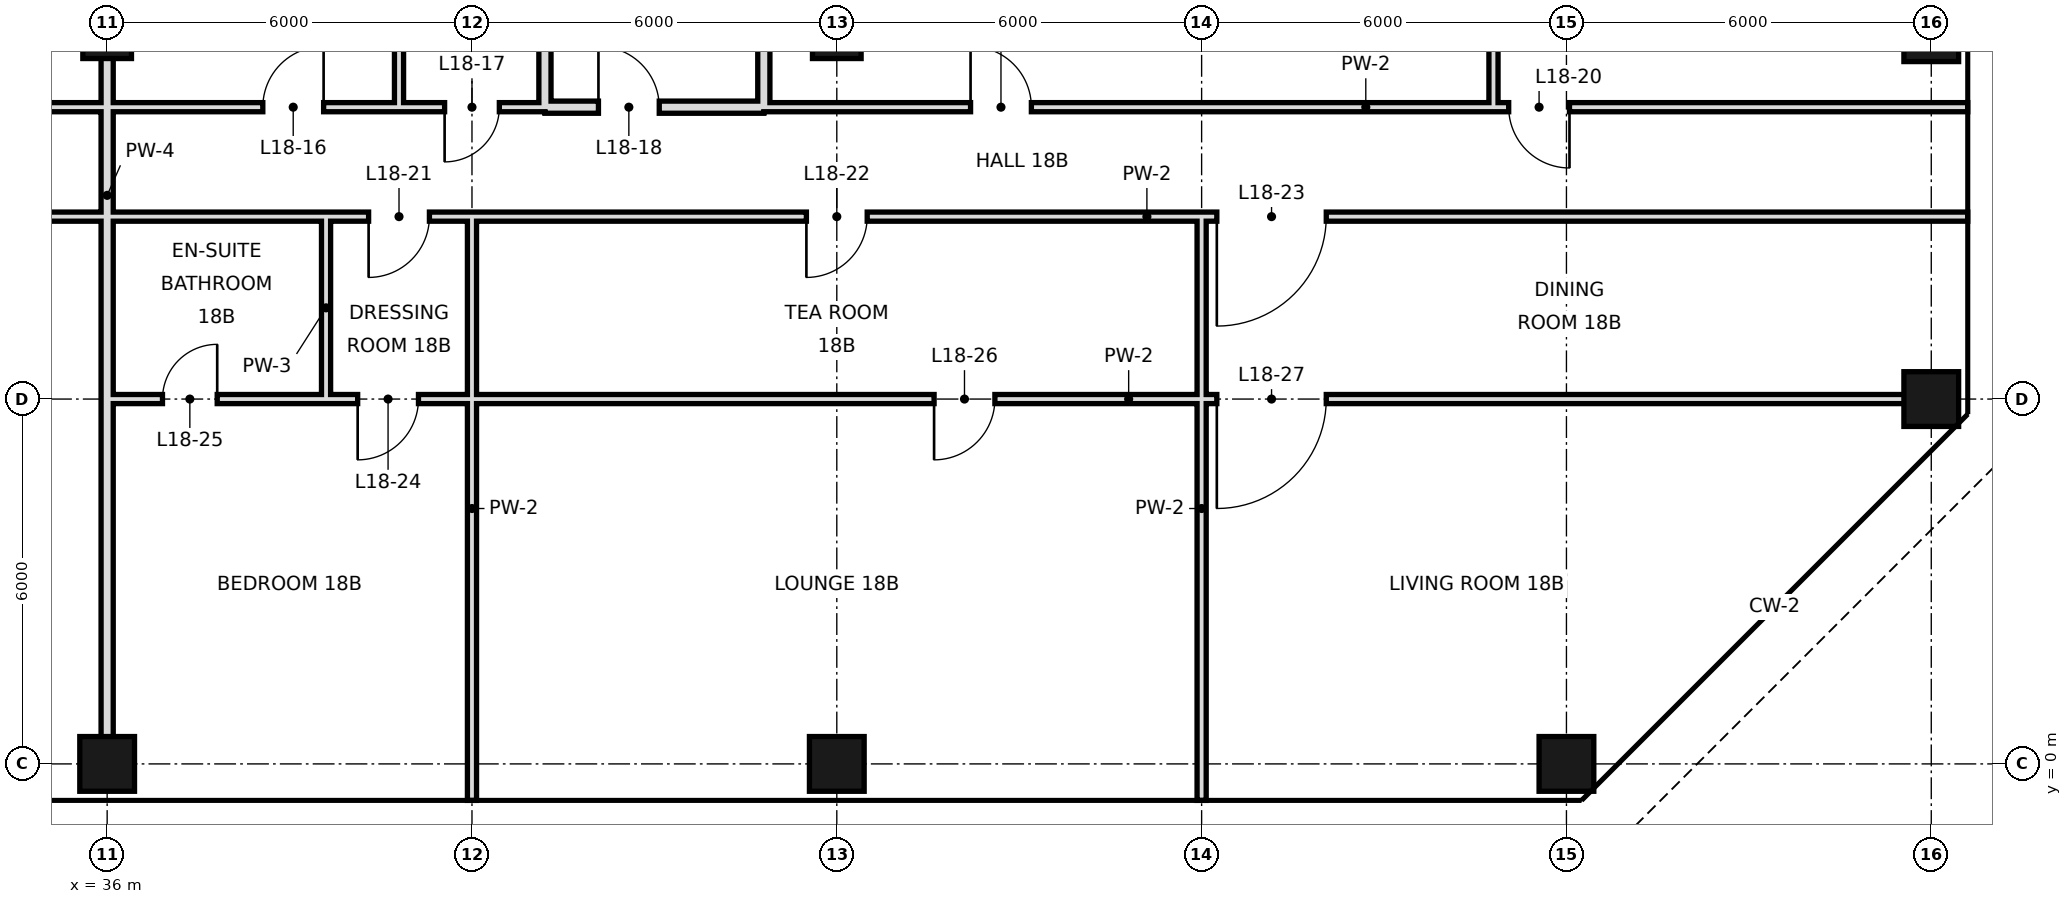
"""IFC4 building model, lengths in metres.
Left out: names, types, materials, properties, quantities, classifications, styles, units other than length and angle.
Written with IfcOpenShell. Run it as: python <this file> out.ifc"""

import sys

from ifc_helpers import new_model, si_unit, direction, frame, frame_2d, origin, origin_2d, place, context, subcontext, project, spatial, rectangle, hollow_rectangle, extrude, element, fill, save


model = new_model("IFC4")
c1 = context("Model", 3, precision=1e-05, world=origin(), true_north=direction((0.0, 1.0)))
c2 = subcontext(c1, "Body", "Model", "MODEL_VIEW")
j1 = project(units=[si_unit("LENGTHUNIT", "METRE"), si_unit("PLANEANGLEUNIT", "RADIAN")], contexts=[c1])
p1 = place(None, origin())
s1 = spatial("IfcSite", under=j1, at=p1, CompositionType="ELEMENT")
p2 = place(p1, origin())
s2 = spatial("IfcBuilding", under=s1, at=p2, CompositionType="ELEMENT")
p3 = place(p2, frame((0.0, 0.0, 85.8)))
s3 = spatial("IfcBuildingStorey", under=s2, at=p3, CompositionType="ELEMENT", Elevation=85.8)
p4 = place(p3, frame((36.0, 0.0, 0.0), z_axis=(0.0, 0.0, 1.0), x_axis=(1.0, 0.0, 0.0)))
e1 = element("IfcColumn", 1, at=p4, inside=s3, PredefinedType="COLUMN", context=c2, shape_type="SweptSolid", body=[
    extrude(hollow_rectangle(XDim=0.9, YDim=0.9, WallThickness=0.045, at=origin_2d()), origin(), (0.0, 0.0, 1.0), 4.4),
])
p5 = place(p3, frame((36.0, 12.0, 0.0), z_axis=(0.0, 0.0, 1.0), x_axis=(1.0, 0.0, 0.0)))
e2 = element("IfcColumn", 2, at=p5, inside=s3, PredefinedType="COLUMN", context=c2, shape_type="SweptSolid", body=[
    extrude(hollow_rectangle(XDim=0.8, YDim=0.8, WallThickness=0.04, at=origin_2d()), origin(), (0.0, 0.0, 1.0), 4.4),
])
p6 = place(p3, frame((48.0, 0.0, 0.0), z_axis=(0.0, 0.0, 1.0), x_axis=(1.0, 0.0, 0.0)))
e3 = element("IfcColumn", 3, at=p6, inside=s3, PredefinedType="COLUMN", context=c2, shape_type="SweptSolid", body=[
    extrude(hollow_rectangle(XDim=0.9, YDim=0.9, WallThickness=0.045, at=origin_2d()), origin(), (0.0, 0.0, 1.0), 4.4),
])
p7 = place(p3, frame((48.0, 12.0, 0.0), z_axis=(0.0, 0.0, 1.0), x_axis=(1.0, 0.0, 0.0)))
e4 = element("IfcColumn", 4, at=p7, inside=s3, PredefinedType="COLUMN", context=c2, shape_type="SweptSolid", body=[
    extrude(hollow_rectangle(XDim=0.8, YDim=0.8, WallThickness=0.04, at=origin_2d()), origin(), (0.0, 0.0, 1.0), 4.4),
])
for number, where, z_axis, x_axis in (
    (5, (60.0, 0.0, 0.0), (0.0, 0.0, 1.0), (1.0, 0.0, 0.0)),
    (6, (66.0, 6.0, 0.0), (0.0, 0.0, 1.0), (1.0, 0.0, 0.0)),
    (7, (66.0, 12.0, 0.0), (0.0, 0.0, 1.0), (1.0, 0.0, 0.0)),
):
    element("IfcColumn", number, at=place(p3, frame(where, z_axis=z_axis, x_axis=x_axis)), inside=s3, PredefinedType="COLUMN", context=c2, shape_type="SweptSolid", body=[
        extrude(hollow_rectangle(XDim=0.9, YDim=0.9, WallThickness=0.045, at=origin_2d()), origin(), (0.0, 0.0, 1.0), 4.4),
    ])
p8 = place(p3, frame((36.0, 0.0, 0.0), z_axis=(0.0, 0.0, 1.0), x_axis=(0.0, 1.0, 0.0)))
e8 = element("IfcWall", 8, at=p8, inside=s3, PredefinedType="SOLIDWALL", context=c2, shape_type="SweptSolid", body=[
    extrude(rectangle(XDim=18.7, YDim=0.2, at=frame_2d((9.35, 0.0))), origin(), (0.0, 0.0, 1.0), 3.4),
])
p9 = place(p3, frame((39.6, 6.0, 0.0), z_axis=(0.0, 0.0, 1.0), x_axis=(0.0, 1.0, 0.0)))
e9 = element("IfcWall", 9, at=p9, inside=s3, PredefinedType="PARTITIONING", context=c2, shape_type="SweptSolid", body=[
    extrude(rectangle(XDim=3.0, YDim=0.15, at=frame_2d((1.5, 0.0))), origin(), (0.0, 0.0, 1.0), 4.1),
])
p10 = place(p3, frame((40.8, 10.8, 0.0), z_axis=(0.0, 0.0, 1.0), x_axis=(0.0, 1.0, 0.0)))
e10 = element("IfcWall", 10, at=p10, inside=s3, PredefinedType="PARTITIONING", context=c2, shape_type="SweptSolid", body=[
    extrude(rectangle(XDim=7.9, YDim=0.15, at=frame_2d((3.95, 0.0))), origin(), (0.0, 0.0, 1.0), 4.1),
])
p11 = place(p3, frame((42.0, -0.6, 0.0), z_axis=(0.0, 0.0, 1.0), x_axis=(0.0, 1.0, 0.0)))
e11 = element("IfcWall", 11, at=p11, inside=s3, PredefinedType="PARTITIONING", context=c2, shape_type="SweptSolid", body=[
    extrude(rectangle(XDim=9.6, YDim=0.15, at=frame_2d((4.8, 0.0))), origin(), (0.0, 0.0, 1.0), 3.4),
])
p12 = place(p3, frame((43.2, 10.8, 0.0), z_axis=(0.0, 0.0, 1.0), x_axis=(0.0, 1.0, 0.0)))
e12 = element("IfcWall", 12, at=p12, inside=s3, PredefinedType="SOLIDWALL", context=c2, shape_type="SweptSolid", body=[
    extrude(rectangle(XDim=7.9, YDim=0.2, at=frame_2d((3.95, 0.0))), origin(), (0.0, 0.0, 1.0), 3.4),
])
p13 = place(p3, frame((46.8, 10.8, 0.0), z_axis=(0.0, 0.0, 1.0), x_axis=(0.0, 1.0, 0.0)))
e13 = element("IfcWall", 13, at=p13, inside=s3, PredefinedType="SOLIDWALL", context=c2, shape_type="SweptSolid", body=[
    extrude(rectangle(XDim=7.2, YDim=0.2, at=frame_2d((3.6, 0.0))), origin(), (0.0, 0.0, 1.0), 3.4),
])
p14 = place(p3, frame((54.0, -0.6, 0.0), z_axis=(0.0, 0.0, 1.0), x_axis=(0.0, 1.0, 0.0)))
e14 = element("IfcWall", 14, at=p14, inside=s3, PredefinedType="PARTITIONING", context=c2, shape_type="SweptSolid", body=[
    extrude(rectangle(XDim=9.6, YDim=0.15, at=frame_2d((4.8, 0.0))), origin(), (0.0, 0.0, 1.0), 4.1),
])
p15 = place(p3, frame((58.8, 10.8, 0.0), z_axis=(0.0, 0.0, 1.0), x_axis=(0.0, 1.0, 0.0)))
e15 = element("IfcWall", 15, at=p15, inside=s3, PredefinedType="PARTITIONING", context=c2, shape_type="SweptSolid", body=[
    extrude(rectangle(XDim=7.2, YDim=0.15, at=frame_2d((3.6, 0.0))), origin(), (0.0, 0.0, 1.0), 4.1),
])
p16 = place(p3, frame((43.2, 10.8, 0.0), z_axis=(0.0, 0.0, 1.0), x_axis=(1.0, 0.0, 0.0)))
e16 = element("IfcWall", 16, at=p16, inside=s3, PredefinedType="SOLIDWALL", context=c2, shape_type="SweptSolid", body=[
    extrude(rectangle(XDim=3.6, YDim=0.2, at=frame_2d((1.8, 0.0))), origin(), (0.0, 0.0, 1.0), 4.1),
])
p17 = place(p16, frame((0.88, 0.0, 0.0)))
e17 = element("IfcOpeningElement", 17, at=p17, cuts=e16, PredefinedType="OPENING", context=c2, shape_type="SweptSolid", body=[
    extrude(rectangle(XDim=1.0, YDim=2.4, at=frame_2d((0.5, 1.2))), frame((0.0, 0.11, 0.0), z_axis=(0.0, -1.0, 0.0), x_axis=(1.0, 0.0, 0.0)), (0.0, 0.0, 1.0), 0.22),
])
p18 = place(p3, frame((19.2, 10.8, 0.0), z_axis=(0.0, 0.0, 1.0), x_axis=(1.0, 0.0, 0.0)))
e18 = element("IfcWall", 18, at=p18, inside=s3, PredefinedType="PARTITIONING", context=c2, shape_type="SweptSolid", body=[
    extrude(rectangle(XDim=21.6, YDim=0.15, at=frame_2d((10.8, 0.0))), origin(), (0.0, 0.0, 1.0), 4.1),
])
p19 = place(p18, frame((13.9, 0.0, 0.0)))
e19 = element("IfcOpeningElement", 19, at=p19, cuts=e18, PredefinedType="OPENING", context=c2, shape_type="SweptSolid", body=[
    extrude(rectangle(XDim=1.0, YDim=2.4, at=frame_2d((0.5, 1.2))), frame((0.0, 0.085, 0.0), z_axis=(0.0, -1.0, 0.0), x_axis=(1.0, 0.0, 0.0)), (0.0, 0.0, 1.0), 0.17),
])
p20 = place(p18, frame((5.5, 0.0, 0.0)))
e20 = element("IfcOpeningElement", 20, at=p20, cuts=e18, PredefinedType="OPENING", context=c2, shape_type="SweptSolid", body=[
    extrude(rectangle(XDim=1.0, YDim=2.4, at=frame_2d((0.5, 1.2))), frame((0.0, 0.085, 0.0), z_axis=(0.0, -1.0, 0.0), x_axis=(1.0, 0.0, 0.0)), (0.0, 0.0, 1.0), 0.17),
])
p21 = place(p18, frame((19.36, 0.0, 0.0)))
e21 = element("IfcOpeningElement", 21, at=p21, cuts=e18, PredefinedType="OPENING", context=c2, shape_type="SweptSolid", body=[
    extrude(rectangle(XDim=1.0, YDim=2.4, at=frame_2d((0.5, 1.2))), frame((0.0, 0.085, 0.0), z_axis=(0.0, -1.0, 0.0), x_axis=(1.0, 0.0, 0.0)), (0.0, 0.0, 1.0), 0.17),
])
p22 = place(p3, frame((46.8, 10.8, 0.0), z_axis=(0.0, 0.0, 1.0), x_axis=(1.0, 0.0, 0.0)))
e22 = element("IfcWall", 22, at=p22, inside=s3, PredefinedType="PARTITIONING", context=c2, shape_type="SweptSolid", body=[
    extrude(rectangle(XDim=19.8, YDim=0.15, at=frame_2d((9.9, 0.0))), origin(), (0.0, 0.0, 1.0), 4.1),
])
p23 = place(p22, frame((3.4, 0.0, 0.0)))
e23 = element("IfcOpeningElement", 23, at=p23, cuts=e22, PredefinedType="OPENING", context=c2, shape_type="SweptSolid", body=[
    extrude(rectangle(XDim=1.0, YDim=2.4, at=frame_2d((0.5, 1.2))), frame((0.0, 0.085, 0.0), z_axis=(0.0, -1.0, 0.0), x_axis=(1.0, 0.0, 0.0)), (0.0, 0.0, 1.0), 0.17),
])
p24 = place(p22, frame((12.25, 0.0, 0.0)))
e24 = element("IfcOpeningElement", 24, at=p24, cuts=e22, PredefinedType="OPENING", context=c2, shape_type="SweptSolid", body=[
    extrude(rectangle(XDim=1.0, YDim=2.4, at=frame_2d((0.5, 1.2))), frame((0.0, 0.085, 0.0), z_axis=(0.0, -1.0, 0.0), x_axis=(1.0, 0.0, 0.0)), (0.0, 0.0, 1.0), 0.17),
])
p25 = place(p3, frame((40.8, 10.8, 0.0), z_axis=(0.0, 0.0, 1.0), x_axis=(1.0, 0.0, 0.0)))
e25 = element("IfcWall", 25, at=p25, inside=s3, PredefinedType="PARTITIONING", context=c2, shape_type="SweptSolid", body=[
    extrude(rectangle(XDim=2.4, YDim=0.15, at=frame_2d((1.2, 0.0))), origin(), (0.0, 0.0, 1.0), 4.1),
])
p26 = place(p25, frame((0.75, 0.0, 0.0)))
e26 = element("IfcOpeningElement", 26, at=p26, cuts=e25, PredefinedType="OPENING", context=c2, shape_type="SweptSolid", body=[
    extrude(rectangle(XDim=0.9, YDim=2.4, at=frame_2d((0.45, 1.2))), frame((0.0, 0.085, 0.0), z_axis=(0.0, -1.0, 0.0), x_axis=(1.0, 0.0, 0.0)), (0.0, 0.0, 1.0), 0.17),
])
p27 = place(p3, frame((39.6, 6.0, 0.0), z_axis=(0.0, 0.0, 1.0), x_axis=(1.0, 0.0, 0.0)))
e27 = element("IfcWall", 27, at=p27, inside=s3, PredefinedType="PARTITIONING", context=c2, shape_type="SweptSolid", body=[
    extrude(rectangle(XDim=26.4, YDim=0.15, at=frame_2d((13.2, 0.0))), origin(), (0.0, 0.0, 1.0), 3.2),
])
p28 = place(p27, frame((0.52, 0.0, 0.0)))
e28 = element("IfcOpeningElement", 28, at=p28, cuts=e27, PredefinedType="OPENING", context=c2, shape_type="SweptSolid", body=[
    extrude(rectangle(XDim=1.0, YDim=2.4, at=frame_2d((0.5, 1.2))), frame((0.0, 0.085, 0.0), z_axis=(0.0, -1.0, 0.0), x_axis=(1.0, 0.0, 0.0)), (0.0, 0.0, 1.0), 0.17),
])
p29 = place(p27, frame((10.0, 0.0, 0.0)))
e29 = element("IfcOpeningElement", 29, at=p29, cuts=e27, PredefinedType="OPENING", context=c2, shape_type="SweptSolid", body=[
    extrude(rectangle(XDim=1.0, YDim=2.4, at=frame_2d((0.5, 1.2))), frame((0.0, 0.085, 0.0), z_axis=(0.0, -1.0, 0.0), x_axis=(1.0, 0.0, 0.0)), (0.0, 0.0, 1.0), 0.17),
])
p30 = place(p27, frame((14.65, 0.0, 0.0)))
e30 = element("IfcOpeningElement", 30, at=p30, cuts=e27, PredefinedType="OPENING", context=c2, shape_type="SweptSolid", body=[
    extrude(rectangle(XDim=1.8, YDim=2.4, at=frame_2d((0.9, 1.2))), frame((0.0, 0.085, 0.0), z_axis=(0.0, -1.0, 0.0), x_axis=(1.0, 0.0, 0.0)), (0.0, 0.0, 1.0), 0.17),
])
p31 = place(p3, frame((36.0, 6.0, 0.0), z_axis=(0.0, 0.0, 1.0), x_axis=(1.0, 0.0, 0.0)))
e31 = element("IfcWall", 31, at=p31, inside=s3, PredefinedType="PARTITIONING", context=c2, shape_type="SweptSolid", body=[
    extrude(rectangle(XDim=3.6, YDim=0.15, at=frame_2d((1.8, 0.0))), origin(), (0.0, 0.0, 1.0), 3.65),
])
p32 = place(p31, frame((0.91, 0.0, 0.0)))
e32 = element("IfcOpeningElement", 32, at=p32, cuts=e31, PredefinedType="OPENING", context=c2, shape_type="SweptSolid", body=[
    extrude(rectangle(XDim=0.9, YDim=2.4, at=frame_2d((0.45, 1.2))), frame((0.0, 0.085, 0.0), z_axis=(0.0, -1.0, 0.0), x_axis=(1.0, 0.0, 0.0)), (0.0, 0.0, 1.0), 0.17),
])
p33 = place(p3, frame((18.0, 9.0, 0.0), z_axis=(0.0, 0.0, 1.0), x_axis=(1.0, 0.0, 0.0)))
e33 = element("IfcWall", 33, at=p33, inside=s3, PredefinedType="PARTITIONING", context=c2, shape_type="SweptSolid", body=[
    extrude(rectangle(XDim=18.0, YDim=0.15, at=frame_2d((9.0, 0.0))), origin(), (0.0, 0.0, 1.0), 4.1),
])
p34 = place(p33, frame((3.16, 0.0, 0.0)))
e34 = element("IfcOpeningElement", 34, at=p34, cuts=e33, PredefinedType="OPENING", context=c2, shape_type="SweptSolid", body=[
    extrude(rectangle(XDim=1.8, YDim=2.4, at=frame_2d((0.9, 1.2))), frame((0.0, 0.085, 0.0), z_axis=(0.0, -1.0, 0.0), x_axis=(1.0, 0.0, 0.0)), (0.0, 0.0, 1.0), 0.17),
])
p35 = place(p33, frame((13.6, 0.0, 0.0)))
e35 = element("IfcOpeningElement", 35, at=p35, cuts=e33, PredefinedType="OPENING", context=c2, shape_type="SweptSolid", body=[
    extrude(rectangle(XDim=1.0, YDim=2.4, at=frame_2d((0.5, 1.2))), frame((0.0, 0.085, 0.0), z_axis=(0.0, -1.0, 0.0), x_axis=(1.0, 0.0, 0.0)), (0.0, 0.0, 1.0), 0.17),
])
p36 = place(p3, frame((39.6, 9.0, 0.0), z_axis=(0.0, 0.0, 1.0), x_axis=(1.0, 0.0, 0.0)))
e36 = element("IfcWall", 36, at=p36, inside=s3, PredefinedType="PARTITIONING", context=c2, shape_type="SweptSolid", body=[
    extrude(rectangle(XDim=27.0, YDim=0.15, at=frame_2d((13.5, 0.0))), origin(), (0.0, 0.0, 1.0), 4.1),
])
p37 = place(p36, frame((0.7, 0.0, 0.0)))
e37 = element("IfcOpeningElement", 37, at=p37, cuts=e36, PredefinedType="OPENING", context=c2, shape_type="SweptSolid", body=[
    extrude(rectangle(XDim=1.0, YDim=2.4, at=frame_2d((0.5, 1.2))), frame((0.0, 0.085, 0.0), z_axis=(0.0, -1.0, 0.0), x_axis=(1.0, 0.0, 0.0)), (0.0, 0.0, 1.0), 0.17),
])
p38 = place(p36, frame((7.9, 0.0, 0.0)))
e38 = element("IfcOpeningElement", 38, at=p38, cuts=e36, PredefinedType="OPENING", context=c2, shape_type="SweptSolid", body=[
    extrude(rectangle(XDim=1.0, YDim=2.4, at=frame_2d((0.5, 1.2))), frame((0.0, 0.085, 0.0), z_axis=(0.0, -1.0, 0.0), x_axis=(1.0, 0.0, 0.0)), (0.0, 0.0, 1.0), 0.17),
])
p39 = place(p36, frame((14.65, 0.0, 0.0)))
e39 = element("IfcOpeningElement", 39, at=p39, cuts=e36, PredefinedType="OPENING", context=c2, shape_type="SweptSolid", body=[
    extrude(rectangle(XDim=1.8, YDim=2.4, at=frame_2d((0.9, 1.2))), frame((0.0, 0.085, 0.0), z_axis=(0.0, -1.0, 0.0), x_axis=(1.0, 0.0, 0.0)), (0.0, 0.0, 1.0), 0.17),
])
p40 = place(p3, frame((36.0, 9.0, 0.0), z_axis=(0.0, 0.0, 1.0), x_axis=(1.0, 0.0, 0.0)))
e40 = element("IfcWall", 40, at=p40, inside=s3, PredefinedType="PARTITIONING", context=c2, shape_type="SweptSolid", body=[
    extrude(rectangle(XDim=3.6, YDim=0.15, at=frame_2d((1.8, 0.0))), origin(), (0.0, 0.0, 1.0), 4.1),
])
p41 = place(p21, frame((1.0, 0.0, 0.0), z_axis=(0.0, 0.0, 1.0), x_axis=(-1.0, 0.0, 0.0)))
e41 = element("IfcDoor", 41, at=p41, inside=s3, OperationType="SINGLE_SWING_LEFT", PredefinedType="DOOR", context=c2, shape_type="SweptSolid", body=[
    extrude(rectangle(XDim=1.0, YDim=2.4, at=frame_2d((0.5, 1.2))), frame((0.0, 0.025, 0.0), z_axis=(0.0, -1.0, 0.0), x_axis=(1.0, 0.0, 0.0)), (0.0, 0.0, 1.0), 0.05),
])
fill(e21, e41)
p42 = place(p26, frame((0.9, 0.0, 0.0), z_axis=(0.0, 0.0, 1.0), x_axis=(-1.0, 0.0, 0.0)))
e42 = element("IfcDoor", 42, at=p42, inside=s3, OperationType="SINGLE_SWING_RIGHT", PredefinedType="DOOR", context=c2, shape_type="SweptSolid", body=[
    extrude(rectangle(XDim=0.9, YDim=2.4, at=frame_2d((0.45, 1.2))), frame((0.0, 0.025, 0.0), z_axis=(0.0, -1.0, 0.0), x_axis=(1.0, 0.0, 0.0)), (0.0, 0.0, 1.0), 0.05),
])
fill(e26, e42)
p43 = place(p17, origin())
e43 = element("IfcDoor", 43, at=p43, inside=s3, OperationType="SINGLE_SWING_LEFT", PredefinedType="DOOR", context=c2, shape_type="SweptSolid", body=[
    extrude(rectangle(XDim=1.0, YDim=2.4, at=frame_2d((0.5, 1.2))), frame((0.0, 0.025, 0.0), z_axis=(0.0, -1.0, 0.0), x_axis=(1.0, 0.0, 0.0)), (0.0, 0.0, 1.0), 0.05),
])
fill(e17, e43)
p44 = place(p23, origin())
e44 = element("IfcDoor", 44, at=p44, inside=s3, OperationType="SINGLE_SWING_LEFT", PredefinedType="DOOR", context=c2, shape_type="SweptSolid", body=[
    extrude(rectangle(XDim=1.0, YDim=2.4, at=frame_2d((0.5, 1.2))), frame((0.0, 0.025, 0.0), z_axis=(0.0, -1.0, 0.0), x_axis=(1.0, 0.0, 0.0)), (0.0, 0.0, 1.0), 0.05),
])
fill(e23, e44)
p45 = place(p24, origin())
e45 = element("IfcDoor", 45, at=p45, inside=s3, OperationType="SINGLE_SWING_RIGHT", PredefinedType="DOOR", context=c2, shape_type="SweptSolid", body=[
    extrude(rectangle(XDim=1.0, YDim=2.4, at=frame_2d((0.5, 1.2))), frame((0.0, 0.025, 0.0), z_axis=(0.0, -1.0, 0.0), x_axis=(1.0, 0.0, 0.0)), (0.0, 0.0, 1.0), 0.05),
])
fill(e24, e45)
p46 = place(p37, frame((1.0, 0.0, 0.0), z_axis=(0.0, 0.0, 1.0), x_axis=(-1.0, 0.0, 0.0)))
e46 = element("IfcDoor", 46, at=p46, inside=s3, OperationType="SINGLE_SWING_RIGHT", PredefinedType="DOOR", context=c2, shape_type="SweptSolid", body=[
    extrude(rectangle(XDim=1.0, YDim=2.4, at=frame_2d((0.5, 1.2))), frame((0.0, 0.025, 0.0), z_axis=(0.0, -1.0, 0.0), x_axis=(1.0, 0.0, 0.0)), (0.0, 0.0, 1.0), 0.05),
])
fill(e37, e46)
p47 = place(p38, frame((1.0, 0.0, 0.0), z_axis=(0.0, 0.0, 1.0), x_axis=(-1.0, 0.0, 0.0)))
e47 = element("IfcDoor", 47, at=p47, inside=s3, OperationType="SINGLE_SWING_RIGHT", PredefinedType="DOOR", context=c2, shape_type="SweptSolid", body=[
    extrude(rectangle(XDim=1.0, YDim=2.4, at=frame_2d((0.5, 1.2))), frame((0.0, 0.025, 0.0), z_axis=(0.0, -1.0, 0.0), x_axis=(1.0, 0.0, 0.0)), (0.0, 0.0, 1.0), 0.05),
])
fill(e38, e47)
p48 = place(p39, frame((1.8, 0.0, 0.0), z_axis=(0.0, 0.0, 1.0), x_axis=(-1.0, 0.0, 0.0)))
e48 = element("IfcDoor", 48, at=p48, inside=s3, OperationType="SINGLE_SWING_RIGHT", PredefinedType="DOOR", context=c2, shape_type="SweptSolid", body=[
    extrude(rectangle(XDim=1.8, YDim=2.4, at=frame_2d((0.9, 1.2))), frame((0.0, 0.025, 0.0), z_axis=(0.0, -1.0, 0.0), x_axis=(1.0, 0.0, 0.0)), (0.0, 0.0, 1.0), 0.05),
])
fill(e39, e48)
p49 = place(p28, frame((1.0, 0.0, 0.0), z_axis=(0.0, 0.0, 1.0), x_axis=(-1.0, 0.0, 0.0)))
e49 = element("IfcDoor", 49, at=p49, inside=s3, OperationType="SINGLE_SWING_RIGHT", PredefinedType="DOOR", context=c2, shape_type="SweptSolid", body=[
    extrude(rectangle(XDim=1.0, YDim=2.4, at=frame_2d((0.5, 1.2))), frame((0.0, 0.025, 0.0), z_axis=(0.0, -1.0, 0.0), x_axis=(1.0, 0.0, 0.0)), (0.0, 0.0, 1.0), 0.05),
])
fill(e28, e49)
p50 = place(p32, frame((0.9, 0.0, 0.0), z_axis=(0.0, 0.0, 1.0), x_axis=(-1.0, 0.0, 0.0)))
e50 = element("IfcDoor", 50, at=p50, inside=s3, OperationType="SINGLE_SWING_LEFT", PredefinedType="DOOR", context=c2, shape_type="SweptSolid", body=[
    extrude(rectangle(XDim=0.9, YDim=2.4, at=frame_2d((0.45, 1.2))), frame((0.0, 0.025, 0.0), z_axis=(0.0, -1.0, 0.0), x_axis=(1.0, 0.0, 0.0)), (0.0, 0.0, 1.0), 0.05),
])
fill(e32, e50)
p51 = place(p29, frame((1.0, 0.0, 0.0), z_axis=(0.0, 0.0, 1.0), x_axis=(-1.0, 0.0, 0.0)))
e51 = element("IfcDoor", 51, at=p51, inside=s3, OperationType="SINGLE_SWING_RIGHT", PredefinedType="DOOR", context=c2, shape_type="SweptSolid", body=[
    extrude(rectangle(XDim=1.0, YDim=2.4, at=frame_2d((0.5, 1.2))), frame((0.0, 0.025, 0.0), z_axis=(0.0, -1.0, 0.0), x_axis=(1.0, 0.0, 0.0)), (0.0, 0.0, 1.0), 0.05),
])
fill(e29, e51)
p52 = place(p30, frame((1.8, 0.0, 0.0), z_axis=(0.0, 0.0, 1.0), x_axis=(-1.0, 0.0, 0.0)))
e52 = element("IfcDoor", 52, at=p52, inside=s3, OperationType="SINGLE_SWING_RIGHT", PredefinedType="DOOR", context=c2, shape_type="SweptSolid", body=[
    extrude(rectangle(XDim=1.8, YDim=2.4, at=frame_2d((0.9, 1.2))), frame((0.0, 0.025, 0.0), z_axis=(0.0, -1.0, 0.0), x_axis=(1.0, 0.0, 0.0)), (0.0, 0.0, 1.0), 0.05),
])
fill(e30, e52)
save(model, sys.argv[1])
